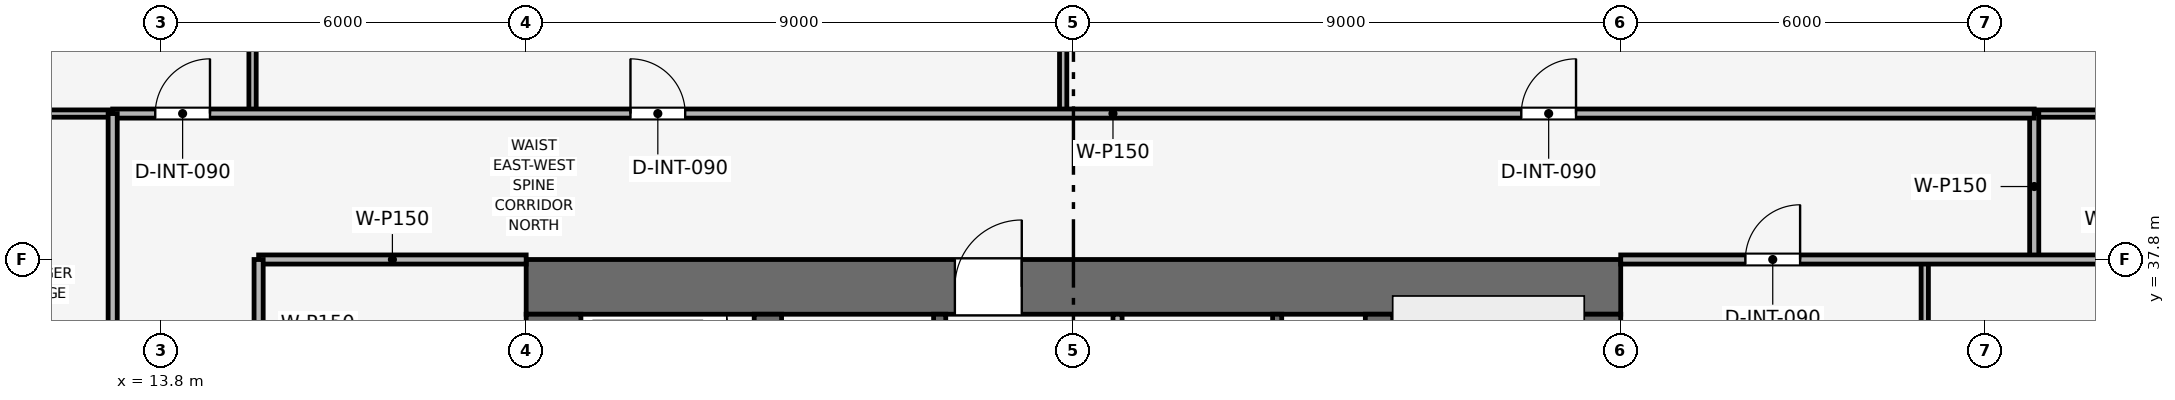
"""IFC4 building model, lengths in metres.
Left out: names, types, materials, properties, quantities, classifications, styles, units other than length and angle.
Written with IfcOpenShell. Run it as: python <this file> out.ifc"""

import sys

from ifc_helpers import new_model, si_unit, direction, frame, frame_2d, origin, place, context, subcontext, project, spatial, rectangle, extrude, element, fill, save


model = new_model("IFC4")
c1 = context("Model", 3, precision=1e-05, world=origin(), true_north=direction((0.0, 1.0)))
c2 = subcontext(c1, "Body", "Model", "MODEL_VIEW")
j1 = project(units=[si_unit("LENGTHUNIT", "METRE"), si_unit("PLANEANGLEUNIT", "RADIAN")], contexts=[c1])
p1 = place(None, origin())
s1 = spatial("IfcSite", under=j1, at=p1, CompositionType="ELEMENT")
p2 = place(p1, origin())
s2 = spatial("IfcBuilding", under=s1, at=p2, CompositionType="ELEMENT")
p3 = place(p2, frame((0.0, 0.0, 190.8)))
s3 = spatial("IfcBuildingStorey", under=s2, at=p3, CompositionType="ELEMENT", Elevation=190.8)
p4 = place(p3, frame((19.8, 37.35, 0.0), z_axis=(0.0, 0.0, 1.0), x_axis=(1.0, 0.0, 0.0)))
e1 = element("IfcWall", 1, at=p4, inside=s3, PredefinedType="SHEAR", context=c2, shape_type="SweptSolid", body=[
    extrude(rectangle(XDim=18.0, YDim=0.9, at=frame_2d((9.0, 0.0))), origin(), (0.0, 0.0, 1.0), 3.75),
])
p5 = place(p4, frame((7.05, 0.0, 0.0)))
e2 = element("IfcOpeningElement", 2, at=p5, cuts=e1, PredefinedType="OPENING", context=c2, shape_type="SweptSolid", body=[
    extrude(rectangle(XDim=1.1, YDim=2.15, at=frame_2d((0.55, 1.075))), frame((0.0, 0.46, 0.0), z_axis=(0.0, -1.0, 0.0), x_axis=(1.0, 0.0, 0.0)), (0.0, 0.0, 1.0), 0.92),
])
p6 = place(p3, frame((20.25, 20.7, 0.0), z_axis=(0.0, 0.0, 1.0), x_axis=(0.0, 1.0, 0.0)))
e3 = element("IfcWall", 3, at=p6, inside=s3, PredefinedType="SHEAR", context=c2, shape_type="SweptSolid", body=[
    extrude(rectangle(XDim=16.2, YDim=0.9, at=frame_2d((8.1, 0.0))), origin(), (0.0, 0.0, 1.0), 3.75),
])
p7 = place(p6, frame((10.1, 0.0, 0.0)))
e4 = element("IfcOpeningElement", 4, at=p7, cuts=e3, PredefinedType="OPENING", context=c2, shape_type="SweptSolid", body=[
    extrude(rectangle(XDim=1.1, YDim=2.15, at=frame_2d((0.55, 1.075))), frame((0.0, 0.46, 0.0), z_axis=(0.0, -1.0, 0.0), x_axis=(1.0, 0.0, 0.0)), (0.0, 0.0, 1.0), 0.92),
])
p8 = place(p3, frame((37.35, 20.7, 0.0), z_axis=(0.0, 0.0, 1.0), x_axis=(0.0, 1.0, 0.0)))
e5 = element("IfcWall", 5, at=p8, inside=s3, PredefinedType="SHEAR", context=c2, shape_type="SweptSolid", body=[
    extrude(rectangle(XDim=16.2, YDim=0.9, at=frame_2d((8.1, 0.0))), origin(), (0.0, 0.0, 1.0), 3.75),
])
p9 = place(p8, frame((4.6, 0.0, 0.0)))
e6 = element("IfcOpeningElement", 6, at=p9, cuts=e5, PredefinedType="OPENING", context=c2, shape_type="SweptSolid", body=[
    extrude(rectangle(XDim=1.1, YDim=2.15, at=frame_2d((0.55, 1.075))), frame((0.0, 0.46, 0.0), z_axis=(0.0, -1.0, 0.0), x_axis=(1.0, 0.0, 0.0)), (0.0, 0.0, 1.0), 0.92),
])
for number, where, z_axis, x_axis in (
    (7, (23.775, 20.7, 0.0), (0.0, 0.0, 1.0), (0.0, 1.0, 0.0)),
    (8, (33.825, 20.7, 0.0), (0.0, 0.0, 1.0), (0.0, 1.0, 0.0)),
):
    element("IfcWall", number, at=place(p3, frame(where, z_axis=z_axis, x_axis=x_axis)), inside=s3, PredefinedType="SHEAR", context=c2, shape_type="SweptSolid", body=[
        extrude(rectangle(XDim=16.2, YDim=0.45, at=frame_2d((8.1, 0.0))), origin(), (0.0, 0.0, 1.0), 3.75),
    ])
p10 = place(p3, frame((32.15, 34.0, 0.0), z_axis=(0.0, 0.0, 1.0), x_axis=(0.0, 1.0, 0.0)))
e9 = element("IfcWall", 9, at=p10, inside=s3, PredefinedType="SHEAR", context=c2, shape_type="SweptSolid", body=[
    extrude(rectangle(XDim=2.9, YDim=0.15, at=frame_2d((1.45, 0.0))), origin(), (0.0, 0.0, 1.0), 3.35),
])
p11 = place(p3, frame((26.6, 34.0, 0.0), z_axis=(0.0, 0.0, 1.0), x_axis=(0.0, 1.0, 0.0)))
e10 = element("IfcWall", 10, at=p11, inside=s3, PredefinedType="SHEAR", context=c2, shape_type="SweptSolid", body=[
    extrude(rectangle(XDim=2.9, YDim=0.2, at=frame_2d((1.45, 0.0))), origin(), (0.0, 0.0, 1.0), 3.35),
])
p12 = place(p11, frame((0.75, 0.0, 0.0)))
e11 = element("IfcOpeningElement", 11, at=p12, cuts=e10, PredefinedType="OPENING", context=c2, shape_type="SweptSolid", body=[
    extrude(rectangle(XDim=1.1, YDim=2.15, at=frame_2d((0.55, 1.075))), frame((0.0, 0.11, 0.0), z_axis=(0.0, -1.0, 0.0), x_axis=(1.0, 0.0, 0.0)), (0.0, 0.0, 1.0), 0.22),
])
p13 = place(p3, frame((29.525, 33.925, 0.0), z_axis=(0.0, 0.0, 1.0), x_axis=(0.0, 1.0, 0.0)))
e12 = element("IfcWall", 12, at=p13, inside=s3, PredefinedType="PARTITIONING", context=c2, shape_type="SweptSolid", body=[
    extrude(rectangle(XDim=2.975, YDim=0.15, at=frame_2d((1.487, 0.0))), origin(), (0.0, 0.0, 1.0), 3.35),
])
p14 = place(p13, frame((0.85, 0.0, 0.0)))
e13 = element("IfcOpeningElement", 13, at=p14, cuts=e12, PredefinedType="OPENING", context=c2, shape_type="SweptSolid", body=[
    extrude(rectangle(XDim=0.9, YDim=2.1, at=frame_2d((0.45, 1.05))), frame((0.0, 0.085, 0.0), z_axis=(0.0, -1.0, 0.0), x_axis=(1.0, 0.0, 0.0)), (0.0, 0.0, 1.0), 0.17),
])
p15 = place(p3, frame((15.4, 37.8, 0.0), z_axis=(0.0, 0.0, 1.0), x_axis=(1.0, 0.0, 0.0)))
e14 = element("IfcWall", 14, at=p15, inside=s3, PredefinedType="PARTITIONING", context=c2, shape_type="SweptSolid", body=[
    extrude(rectangle(XDim=4.4, YDim=0.15, at=frame_2d((2.2, 0.0))), origin(), (0.0, 0.0, 1.0), 2.885),
])
p16 = place(p3, frame((15.4, 32.45, 0.0), z_axis=(0.0, 0.0, 1.0), x_axis=(0.0, 1.0, 0.0)))
e15 = element("IfcWall", 15, at=p16, inside=s3, PredefinedType="PARTITIONING", context=c2, shape_type="SweptSolid", body=[
    extrude(rectangle(XDim=5.35, YDim=0.15, at=frame_2d((2.675, 0.0))), origin(), (0.0, 0.0, 1.0), 2.885),
])
p17 = place(p16, frame((2.1, 0.0, 0.0)))
e16 = element("IfcOpeningElement", 16, at=p17, cuts=e15, PredefinedType="OPENING", context=c2, shape_type="SweptSolid", body=[
    extrude(rectangle(XDim=0.9, YDim=2.1, at=frame_2d((0.45, 1.05))), frame((0.0, 0.085, 0.0), z_axis=(0.0, -1.0, 0.0), x_axis=(1.0, 0.0, 0.0)), (0.0, 0.0, 1.0), 0.17),
])
for number, where, z_axis, x_axis in (
    (17, (15.3, 40.2, 0.0), (0.0, 0.0, 1.0), (0.0, 1.0, 0.0)),
    (18, (28.631, 40.2, 0.0), (0.0, 0.0, 1.0), (0.0, 1.0, 0.0)),
):
    element("IfcWall", number, at=place(p3, frame(where, z_axis=z_axis, x_axis=x_axis)), inside=s3, PredefinedType="PARTITIONING", context=c2, shape_type="SweptSolid", body=[
        extrude(rectangle(XDim=12.77, YDim=0.12, at=frame_2d((6.385, 0.0))), origin(), (0.0, 0.0, 1.0), 2.835),
    ])
p18 = place(p3, frame((42.8, 26.85, 0.0), z_axis=(0.0, 0.0, 1.0), x_axis=(0.0, 1.0, 0.0)))
e19 = element("IfcWall", 19, at=p18, inside=s3, PredefinedType="PARTITIONING", context=c2, shape_type="SweptSolid", body=[
    extrude(rectangle(XDim=10.95, YDim=0.12, at=frame_2d((5.475, 0.0))), origin(), (0.0, 0.0, 1.0), 2.885),
])
p19 = place(p18, frame((5.025, 0.0, 0.0)))
e20 = element("IfcOpeningElement", 20, at=p19, cuts=e19, PredefinedType="OPENING", context=c2, shape_type="SweptSolid", body=[
    extrude(rectangle(XDim=0.9, YDim=2.1, at=frame_2d((0.45, 1.05))), frame((0.0, 0.07, 0.0), z_axis=(0.0, -1.0, 0.0), x_axis=(1.0, 0.0, 0.0)), (0.0, 0.0, 1.0), 0.14),
])
p20 = place(p3, frame((4.63, 40.2, 0.0), z_axis=(0.0, 0.0, 1.0), x_axis=(1.0, 0.0, 0.0)))
e21 = element("IfcWall", 21, at=p20, inside=s3, PredefinedType="PARTITIONING", context=c2, shape_type="SweptSolid", body=[
    extrude(rectangle(XDim=8.37, YDim=0.12, at=frame_2d((4.185, 0.0))), origin(), (0.0, 0.0, 1.0), 2.835),
])
p21 = place(p3, frame((44.6, 40.2, 0.0), z_axis=(0.0, 0.0, 1.0), x_axis=(1.0, 0.0, 0.0)))
e22 = element("IfcWall", 22, at=p21, inside=s3, PredefinedType="PARTITIONING", context=c2, shape_type="SweptSolid", body=[
    extrude(rectangle(XDim=8.37, YDim=0.12, at=frame_2d((4.185, 0.0))), origin(), (0.0, 0.0, 1.0), 2.835),
])
p22 = place(p3, frame((44.6, 37.8, 0.0), z_axis=(0.0, 0.0, 1.0), x_axis=(0.0, 1.0, 0.0)))
e23 = element("IfcWall", 23, at=p22, inside=s3, PredefinedType="PARTITIONING", context=c2, shape_type="SweptSolid", body=[
    extrude(rectangle(XDim=2.4, YDim=0.15, at=frame_2d((1.2, 0.0))), origin(), (0.0, 0.0, 1.0), 3.35),
])
p23 = place(p3, frame((37.8, 37.8, 0.0), z_axis=(0.0, 0.0, 1.0), x_axis=(1.0, 0.0, 0.0)))
e24 = element("IfcWall", 24, at=p23, inside=s3, PredefinedType="PARTITIONING", context=c2, shape_type="SweptSolid", body=[
    extrude(rectangle(XDim=15.17, YDim=0.15, at=frame_2d((7.585, 0.0))), origin(), (0.0, 0.0, 1.0), 2.835),
])
p24 = place(p23, frame((2.05, 0.0, 0.0)))
e25 = element("IfcOpeningElement", 25, at=p24, cuts=e24, PredefinedType="OPENING", context=c2, shape_type="SweptSolid", body=[
    extrude(rectangle(XDim=0.9, YDim=2.1, at=frame_2d((0.45, 1.05))), frame((0.0, 0.085, 0.0), z_axis=(0.0, -1.0, 0.0), x_axis=(1.0, 0.0, 0.0)), (0.0, 0.0, 1.0), 0.17),
])
p25 = place(p3, frame((13.0, 40.2, 0.0), z_axis=(0.0, 0.0, 1.0), x_axis=(1.0, 0.0, 0.0)))
e26 = element("IfcWall", 26, at=p25, inside=s3, PredefinedType="PARTITIONING", context=c2, shape_type="SweptSolid", body=[
    extrude(rectangle(XDim=31.6, YDim=0.15, at=frame_2d((15.8, 0.0))), origin(), (0.0, 0.0, 1.0), 2.885),
])
p26 = place(p25, frame((0.7, 0.0, 0.0)))
e27 = element("IfcOpeningElement", 27, at=p26, cuts=e26, PredefinedType="OPENING", context=c2, shape_type="SweptSolid", body=[
    extrude(rectangle(XDim=0.9, YDim=2.1, at=frame_2d((0.45, 1.05))), frame((0.0, 0.085, 0.0), z_axis=(0.0, -1.0, 0.0), x_axis=(1.0, 0.0, 0.0)), (0.0, 0.0, 1.0), 0.17),
])
p27 = place(p25, frame((8.515, 0.0, 0.0)))
e28 = element("IfcOpeningElement", 28, at=p27, cuts=e26, PredefinedType="OPENING", context=c2, shape_type="SweptSolid", body=[
    extrude(rectangle(XDim=0.9, YDim=2.1, at=frame_2d((0.45, 1.05))), frame((0.0, 0.085, 0.0), z_axis=(0.0, -1.0, 0.0), x_axis=(1.0, 0.0, 0.0)), (0.0, 0.0, 1.0), 0.17),
])
p28 = place(p25, frame((23.165, 0.0, 0.0)))
e29 = element("IfcOpeningElement", 29, at=p28, cuts=e26, PredefinedType="OPENING", context=c2, shape_type="SweptSolid", body=[
    extrude(rectangle(XDim=0.9, YDim=2.1, at=frame_2d((0.45, 1.05))), frame((0.0, 0.085, 0.0), z_axis=(0.0, -1.0, 0.0), x_axis=(1.0, 0.0, 0.0)), (0.0, 0.0, 1.0), 0.17),
])
p29 = place(p3, frame((13.0, 17.4, 0.0), z_axis=(0.0, 0.0, 1.0), x_axis=(0.0, 1.0, 0.0)))
e30 = element("IfcWall", 30, at=p29, inside=s3, PredefinedType="PARTITIONING", context=c2, shape_type="SweptSolid", body=[
    extrude(rectangle(XDim=22.8, YDim=0.15, at=frame_2d((11.4, 0.0))), origin(), (0.0, 0.0, 1.0), 2.885),
])
p30 = place(p29, frame((3.191, 0.0, 0.0)))
e31 = element("IfcOpeningElement", 31, at=p30, cuts=e30, PredefinedType="OPENING", context=c2, shape_type="SweptSolid", body=[
    extrude(rectangle(XDim=0.9, YDim=2.1, at=frame_2d((0.45, 1.05))), frame((0.0, 0.085, 0.0), z_axis=(0.0, -1.0, 0.0), x_axis=(1.0, 0.0, 0.0)), (0.0, 0.0, 1.0), 0.17),
])
p31 = place(p29, frame((6.581, 0.0, 0.0)))
e32 = element("IfcOpeningElement", 32, at=p31, cuts=e30, PredefinedType="OPENING", context=c2, shape_type="SweptSolid", body=[
    extrude(rectangle(XDim=0.9, YDim=2.1, at=frame_2d((0.45, 1.05))), frame((0.0, 0.085, 0.0), z_axis=(0.0, -1.0, 0.0), x_axis=(1.0, 0.0, 0.0)), (0.0, 0.0, 1.0), 0.17),
])
p32 = place(p29, frame((10.878, 0.0, 0.0)))
e33 = element("IfcOpeningElement", 33, at=p32, cuts=e30, PredefinedType="OPENING", context=c2, shape_type="SweptSolid", body=[
    extrude(rectangle(XDim=0.9, YDim=2.1, at=frame_2d((0.45, 1.05))), frame((0.0, 0.085, 0.0), z_axis=(0.0, -1.0, 0.0), x_axis=(1.0, 0.0, 0.0)), (0.0, 0.0, 1.0), 0.17),
])
p33 = place(p29, frame((16.488, 0.0, 0.0)))
e34 = element("IfcOpeningElement", 34, at=p33, cuts=e30, PredefinedType="OPENING", context=c2, shape_type="SweptSolid", body=[
    extrude(rectangle(XDim=0.9, YDim=2.1, at=frame_2d((0.45, 1.05))), frame((0.0, 0.085, 0.0), z_axis=(0.0, -1.0, 0.0), x_axis=(1.0, 0.0, 0.0)), (0.0, 0.0, 1.0), 0.17),
])
p34 = place(p24, origin())
e35 = element("IfcDoor", 35, at=p34, inside=s3, OperationType="SINGLE_SWING_RIGHT", PredefinedType="DOOR", context=c2, shape_type="SweptSolid", body=[
    extrude(rectangle(XDim=0.9, YDim=2.1, at=frame_2d((0.45, 1.05))), frame((0.0, 0.025, 0.0), z_axis=(0.0, -1.0, 0.0), x_axis=(1.0, 0.0, 0.0)), (0.0, 0.0, 1.0), 0.05),
])
fill(e25, e35)
p35 = place(p26, origin())
e36 = element("IfcDoor", 36, at=p35, inside=s3, OperationType="SINGLE_SWING_RIGHT", PredefinedType="DOOR", context=c2, shape_type="SweptSolid", body=[
    extrude(rectangle(XDim=0.9, YDim=2.1, at=frame_2d((0.45, 1.05))), frame((0.0, 0.025, 0.0), z_axis=(0.0, -1.0, 0.0), x_axis=(1.0, 0.0, 0.0)), (0.0, 0.0, 1.0), 0.05),
])
fill(e27, e36)
p36 = place(p27, origin())
e37 = element("IfcDoor", 37, at=p36, inside=s3, OperationType="SINGLE_SWING_LEFT", PredefinedType="DOOR", context=c2, shape_type="SweptSolid", body=[
    extrude(rectangle(XDim=0.9, YDim=2.1, at=frame_2d((0.45, 1.05))), frame((0.0, 0.025, 0.0), z_axis=(0.0, -1.0, 0.0), x_axis=(1.0, 0.0, 0.0)), (0.0, 0.0, 1.0), 0.05),
])
fill(e28, e37)
p37 = place(p28, origin())
e38 = element("IfcDoor", 38, at=p37, inside=s3, OperationType="SINGLE_SWING_RIGHT", PredefinedType="DOOR", context=c2, shape_type="SweptSolid", body=[
    extrude(rectangle(XDim=0.9, YDim=2.1, at=frame_2d((0.45, 1.05))), frame((0.0, 0.025, 0.0), z_axis=(0.0, -1.0, 0.0), x_axis=(1.0, 0.0, 0.0)), (0.0, 0.0, 1.0), 0.05),
])
fill(e29, e38)
p38 = place(p5, origin())
e39 = element("IfcDoor", 39, at=p38, inside=s3, OperationType="SINGLE_SWING_RIGHT", PredefinedType="DOOR", context=c2, shape_type="SweptSolid", body=[
    extrude(rectangle(XDim=1.1, YDim=2.15, at=frame_2d((0.55, 1.075))), frame((0.0, 0.025, 0.0), z_axis=(0.0, -1.0, 0.0), x_axis=(1.0, 0.0, 0.0)), (0.0, 0.0, 1.0), 0.05),
])
fill(e2, e39)
save(model, sys.argv[1])
